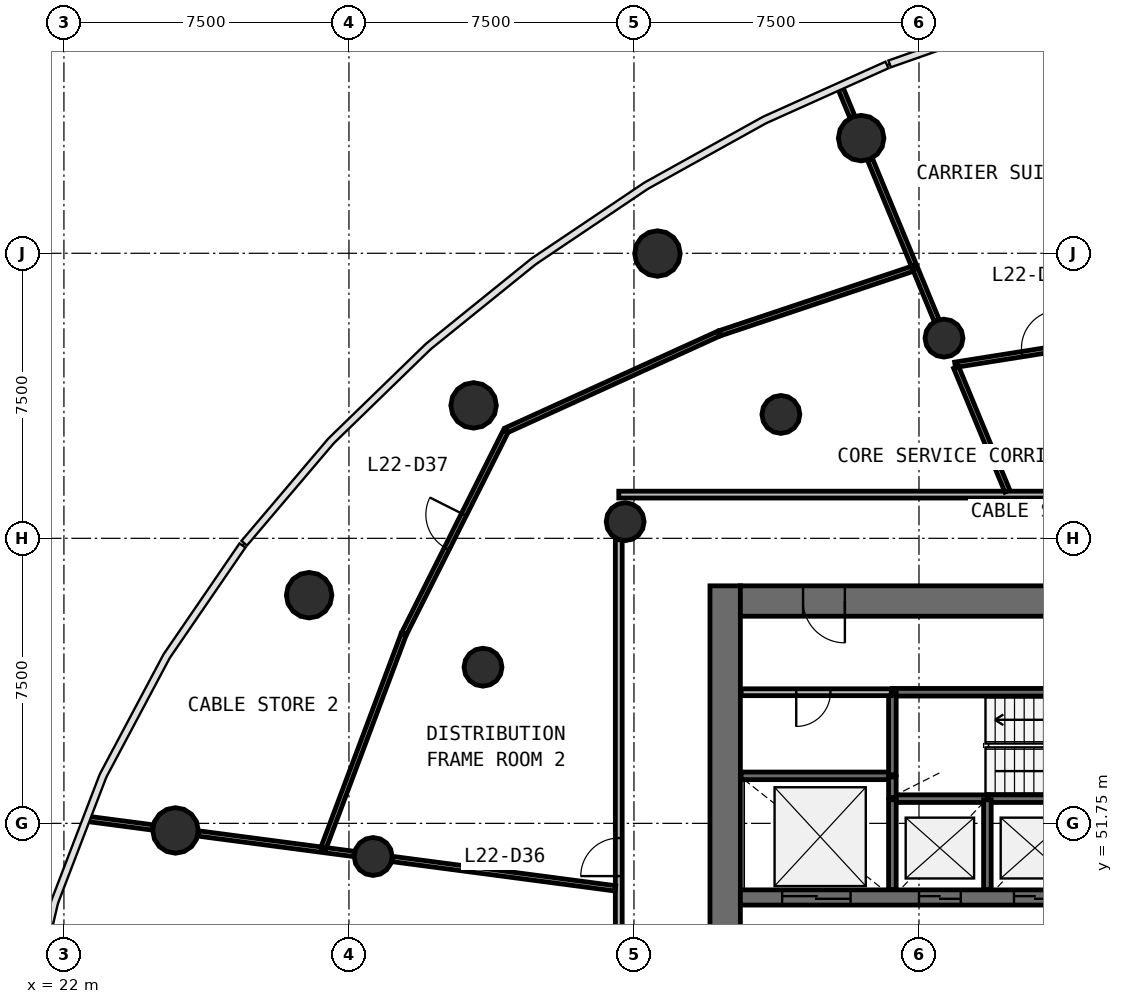
"""IFC4 building model, lengths in metres.
Left out: names, types, materials, properties, quantities, classifications, styles, units other than length and angle.
Written with IfcOpenShell. Run it as: python <this file> out.ifc"""

import sys

from ifc_helpers import new_model, si_unit, direction, frame, frame_2d, origin, origin_2d, place, context, subcontext, project, spatial, rectangle, circle, extrude, source, transform, mapped, element, fill, save


model = new_model("IFC4")
c1 = context("Model", 3, precision=1e-05, world=origin(), true_north=direction((0.0, 1.0)))
c2 = subcontext(c1, "Body", "Model", "MODEL_VIEW")
j1 = project(units=[si_unit("LENGTHUNIT", "METRE"), si_unit("PLANEANGLEUNIT", "RADIAN")], contexts=[c1])
p1 = place(None, origin())
s1 = spatial("IfcSite", under=j1, at=p1, CompositionType="ELEMENT")
p2 = place(p1, origin())
s2 = spatial("IfcBuilding", under=s1, at=p2, CompositionType="ELEMENT")
p3 = place(p2, frame((0.0, 0.0, 96.2)))
s3 = spatial("IfcBuildingStorey", under=s2, at=p3, CompositionType="ELEMENT", Elevation=96.2)
p4 = place(p3, frame((39.4, 58.0, 0.0), z_axis=(0.0, 0.0, 1.0), x_axis=(0.0, -1.0, 0.0)))
e1 = element("IfcWall", 1, at=p4, inside=s3, PredefinedType="SHEAR", context=c2, shape_type="SweptSolid", body=[
    extrude(rectangle(XDim=20.0, YDim=0.8, at=frame_2d((10.0, 0.0))), origin(), (0.0, 0.0, 1.0), 4.1),
])
p5 = place(p4, frame((9.1, 0.0, 0.0)))
e2 = element("IfcOpeningElement", 2, at=p5, cuts=e1, PredefinedType="OPENING", context=c2, shape_type="SweptSolid", body=[
    extrude(rectangle(XDim=1.8, YDim=2.1, at=frame_2d((0.9, 1.05))), frame((0.0, 0.41, 0.0), z_axis=(0.0, -1.0, 0.0), x_axis=(1.0, 0.0, 0.0)), (0.0, 0.0, 1.0), 0.82),
])
p6 = place(p3, frame((64.2, 57.6, 0.0), z_axis=(0.0, 0.0, 1.0), x_axis=(-1.0, 0.0, 0.0)))
e3 = element("IfcWall", 3, at=p6, inside=s3, PredefinedType="SHEAR", context=c2, shape_type="SweptSolid", body=[
    extrude(rectangle(XDim=24.4, YDim=0.8, at=frame_2d((12.2, 0.0))), origin(), (0.0, 0.0, 1.0), 4.1),
])
p7 = place(p6, frame((21.65, 0.0, 0.0)))
e4 = element("IfcOpeningElement", 4, at=p7, cuts=e3, PredefinedType="OPENING", context=c2, shape_type="SweptSolid", body=[
    extrude(rectangle(XDim=1.1, YDim=2.1, at=frame_2d((0.55, 1.05))), frame((0.0, 0.41, 0.0), z_axis=(0.0, -1.0, 0.0), x_axis=(1.0, 0.0, 0.0)), (0.0, 0.0, 1.0), 0.82),
])
p8 = place(p6, frame((2.15, 0.0, 0.0)))
e5 = element("IfcOpeningElement", 5, at=p8, cuts=e3, PredefinedType="OPENING", context=c2, shape_type="SweptSolid", body=[
    extrude(rectangle(XDim=1.1, YDim=2.1, at=frame_2d((0.55, 1.05))), frame((0.0, 0.41, 0.0), z_axis=(0.0, -1.0, 0.0), x_axis=(1.0, 0.0, 0.0)), (0.0, 0.0, 1.0), 0.82),
])
p9 = place(p3, frame((39.8, 49.8, 0.0), z_axis=(0.0, 0.0, 1.0), x_axis=(1.0, 0.0, 0.0)))
e6 = element("IfcWall", 6, at=p9, inside=s3, PredefinedType="SHEAR", context=c2, shape_type="SweptSolid", body=[
    extrude(rectangle(XDim=24.4, YDim=0.4, at=frame_2d((12.2, 0.0))), origin(), (0.0, 0.0, 1.0), 4.1),
])
p10 = place(p9, frame((4.7, 0.0, 0.0)))
e7 = element("IfcOpeningElement", 7, at=p10, cuts=e6, PredefinedType="OPENING", context=c2, shape_type="SweptSolid", body=[
    extrude(rectangle(XDim=1.1, YDim=2.1, at=frame_2d((0.55, 1.05))), frame((0.0, 0.21, 0.0), z_axis=(0.0, -1.0, 0.0), x_axis=(1.0, 0.0, 0.0)), (0.0, 0.0, 1.0), 0.42),
])
p11 = place(p9, frame((7.2, 0.0, 0.0)))
e8 = element("IfcOpeningElement", 8, at=p11, cuts=e6, PredefinedType="OPENING", context=c2, shape_type="SweptSolid", body=[
    extrude(rectangle(XDim=1.1, YDim=2.1, at=frame_2d((0.55, 1.05))), frame((0.0, 0.21, 0.0), z_axis=(0.0, -1.0, 0.0), x_axis=(1.0, 0.0, 0.0)), (0.0, 0.0, 1.0), 0.42),
])
p12 = place(p9, frame((9.7, 0.0, 0.0)))
e9 = element("IfcOpeningElement", 9, at=p12, cuts=e6, PredefinedType="OPENING", context=c2, shape_type="SweptSolid", body=[
    extrude(rectangle(XDim=1.1, YDim=2.1, at=frame_2d((0.55, 1.05))), frame((0.0, 0.21, 0.0), z_axis=(0.0, -1.0, 0.0), x_axis=(1.0, 0.0, 0.0)), (0.0, 0.0, 1.0), 0.42),
])
p13 = place(p9, frame((1.1, 0.0, 0.0)))
e10 = element("IfcOpeningElement", 10, at=p13, cuts=e6, PredefinedType="OPENING", context=c2, shape_type="SweptSolid", body=[
    extrude(rectangle(XDim=1.8, YDim=2.4, at=frame_2d((0.9, 1.2))), frame((0.0, 0.21, 0.0), z_axis=(0.0, -1.0, 0.0), x_axis=(1.0, 0.0, 0.0)), (0.0, 0.0, 1.0), 0.42),
])
p14 = place(p9, frame((20.65, 0.0, 0.0)))
e11 = element("IfcOpeningElement", 11, at=p14, cuts=e6, PredefinedType="OPENING", context=c2, shape_type="SweptSolid", body=[
    extrude(rectangle(XDim=0.9, YDim=2.1, at=frame_2d((0.45, 1.05))), frame((0.0, 0.21, 0.0), z_axis=(0.0, -1.0, 0.0), x_axis=(1.0, 0.0, 0.0)), (0.0, 0.0, 1.0), 0.42),
])
p15 = place(p9, frame((11.85, 0.0, 0.0)))
e12 = element("IfcOpeningElement", 12, at=p15, cuts=e6, PredefinedType="OPENING", context=c2, shape_type="SweptSolid", body=[
    extrude(rectangle(XDim=0.9, YDim=2.1, at=frame_2d((0.45, 1.05))), frame((0.0, 0.21, 0.0), z_axis=(0.0, -1.0, 0.0), x_axis=(1.0, 0.0, 0.0)), (0.0, 0.0, 1.0), 0.42),
])
m1 = source(origin(), c2, "Body", "SweptSolid", [
    extrude(circle(Radius=0.6, at=origin_2d()), origin(), (0.0, 0.0, 1.0), 4.1),
])
for number, where, z_axis, x_axis in (
    (13, (42.978, 69.781, 0.0), (0.0, 0.0, 1.0), (1.0, 0.0, 0.0)),
    (14, (37.618, 66.743, 0.0), (0.0, 0.0, 1.0), (1.0, 0.0, 0.0)),
    (15, (32.78, 62.748, 0.0), (0.0, 0.0, 1.0), (1.0, 0.0, 0.0)),
    (16, (28.452, 57.754, 0.0), (0.0, 0.0, 1.0), (1.0, 0.0, 0.0)),
    (17, (24.936, 51.563, 0.0), (0.0, 0.0, 1.0), (1.0, 0.0, 0.0)),
):
    element("IfcColumn", number, at=place(p3, frame(where, z_axis=z_axis, x_axis=x_axis)), inside=s3, PredefinedType="COLUMN", context=c2, shape_type="MappedRepresentation", body=[
        mapped(m1, transform((0.0, 0.0, 0.0), scale=1.0)),
    ])
m2 = source(origin(), c2, "Body", "SweptSolid", [
    extrude(circle(Radius=0.5, at=origin_2d()), origin(), (0.0, 0.0, 1.0), 4.1),
])
for number, where, z_axis, x_axis in (
    (18, (45.158, 64.518, 0.0), (0.0, 0.0, 1.0), (1.0, 0.0, 0.0)),
    (19, (40.866, 62.51, 0.0), (0.0, 0.0, 1.0), (1.0, 0.0, 0.0)),
    (20, (36.768, 59.688, 0.0), (0.0, 0.0, 1.0), (1.0, 0.0, 0.0)),
    (21, (33.028, 55.859, 0.0), (0.0, 0.0, 1.0), (1.0, 0.0, 0.0)),
    (22, (30.137, 50.878, 0.0), (0.0, 0.0, 1.0), (1.0, 0.0, 0.0)),
):
    element("IfcColumn", number, at=place(p3, frame(where, z_axis=z_axis, x_axis=x_axis)), inside=s3, PredefinedType="COLUMN", context=c2, shape_type="MappedRepresentation", body=[
        mapped(m2, transform((0.0, 0.0, 0.0), scale=1.0)),
    ])
p16 = place(p3, frame((50.4, 55.2, 0.0), z_axis=(0.0, 0.0, 1.0), x_axis=(-1.0, 0.0, 0.0)))
e23 = element("IfcWall", 23, at=p16, inside=s3, PredefinedType="SOLIDWALL", context=c2, shape_type="SweptSolid", body=[
    extrude(rectangle(XDim=6.6, YDim=0.2, at=frame_2d((3.3, 0.0))), origin(), (0.0, 0.0, 1.0), 3.7),
])
p17 = place(p16, frame((0.3, 0.0, 0.0)))
e24 = element("IfcOpeningElement", 24, at=p17, cuts=e23, PredefinedType="OPENING", context=c2, shape_type="SweptSolid", body=[
    extrude(rectangle(XDim=1.2, YDim=2.1, at=frame_2d((0.6, 1.05))), frame((0.0, 0.11, 0.0), z_axis=(0.0, -1.0, 0.0), x_axis=(1.0, 0.0, 0.0)), (0.0, 0.0, 1.0), 0.22),
])
p18 = place(p3, frame((43.8, 53.0, 0.0), z_axis=(0.0, 0.0, 1.0), x_axis=(-1.0, 0.0, 0.0)))
e25 = element("IfcWall", 25, at=p18, inside=s3, PredefinedType="SOLIDWALL", context=c2, shape_type="SweptSolid", body=[
    extrude(rectangle(XDim=3.98, YDim=0.2, at=frame_2d((1.99, 0.0))), origin(), (0.0, 0.0, 1.0), 3.7),
])
p19 = place(p3, frame((46.3, 52.4, 0.0), z_axis=(0.0, 0.0, 1.0), x_axis=(-1.0, 0.0, 0.0)))
e26 = element("IfcWall", 26, at=p19, inside=s3, PredefinedType="SOLIDWALL", context=c2, shape_type="SweptSolid", body=[
    extrude(rectangle(XDim=2.5, YDim=0.2, at=frame_2d((1.25, 0.0))), origin(), (0.0, 0.0, 1.0), 3.7),
])
p20 = place(p3, frame((48.8, 52.4, 0.0), z_axis=(0.0, 0.0, 1.0), x_axis=(-1.0, 0.0, 0.0)))
e27 = element("IfcWall", 27, at=p20, inside=s3, PredefinedType="SOLIDWALL", context=c2, shape_type="SweptSolid", body=[
    extrude(rectangle(XDim=2.47, YDim=0.2, at=frame_2d((1.235, 0.0))), origin(), (0.0, 0.0, 1.0), 3.7),
])
for number, where, z_axis, x_axis in (
    (28, (43.8, 52.37, 0.0), (0.0, 0.0, 1.0), (0.0, -1.0, 0.0)),
    (29, (46.3, 50.01, 0.0), (0.0, 0.0, 1.0), (0.0, 1.0, 0.0)),
):
    element("IfcWall", number, at=place(p3, frame(where, z_axis=z_axis, x_axis=x_axis)), inside=s3, PredefinedType="SOLIDWALL", context=c2, shape_type="SweptSolid", body=[
        extrude(rectangle(XDim=2.36, YDim=0.2, at=frame_2d((1.18, 0.0))), origin(), (0.0, 0.0, 1.0), 3.7),
    ])
p21 = place(p3, frame((43.8, 55.17, 0.0), z_axis=(0.0, 0.0, 1.0), x_axis=(0.0, -1.0, 0.0)))
e30 = element("IfcWall", 30, at=p21, inside=s3, PredefinedType="SOLIDWALL", context=c2, shape_type="SweptSolid", body=[
    extrude(rectangle(XDim=2.14, YDim=0.2, at=frame_2d((1.07, 0.0))), origin(), (0.0, 0.0, 1.0), 3.7),
])
p22 = place(p3, frame((43.8, 52.43, 0.0), z_axis=(0.0, 0.0, 1.0), x_axis=(0.0, 1.0, 0.0)))
e31 = element("IfcWall", 31, at=p22, inside=s3, PredefinedType="SOLIDWALL", context=c2, shape_type="SweptSolid", body=[
    extrude(rectangle(XDim=0.54, YDim=0.2, at=frame_2d((0.27, 0.0))), origin(), (0.0, 0.0, 1.0), 3.7),
])
p23 = place(p3, frame((36.6, 60.4, 0.0), z_axis=(0.0, 0.0, 1.0), x_axis=(1.0, 0.0, 0.0)))
e32 = element("IfcWall", 32, at=p23, inside=s3, PredefinedType="PARTITIONING", context=c2, shape_type="SweptSolid", body=[
    extrude(rectangle(XDim=30.8, YDim=0.18, at=frame_2d((15.4, 0.0))), origin(), (0.0, 0.0, 1.0), 2.9),
])
p24 = place(p23, frame((17.35, 0.0, 0.0)))
e33 = element("IfcOpeningElement", 33, at=p24, cuts=e32, PredefinedType="OPENING", context=c2, shape_type="SweptSolid", body=[
    extrude(rectangle(XDim=1.0, YDim=2.1, at=frame_2d((0.5, 1.05))), frame((0.0, 0.1, 0.0), z_axis=(0.0, -1.0, 0.0), x_axis=(1.0, 0.0, 0.0)), (0.0, 0.0, 1.0), 0.2),
])
p25 = place(p23, frame((14.95, 0.0, 0.0)))
e34 = element("IfcOpeningElement", 34, at=p25, cuts=e32, PredefinedType="OPENING", context=c2, shape_type="SweptSolid", body=[
    extrude(rectangle(XDim=1.0, YDim=2.1, at=frame_2d((0.5, 1.05))), frame((0.0, 0.1, 0.0), z_axis=(0.0, -1.0, 0.0), x_axis=(1.0, 0.0, 0.0)), (0.0, 0.0, 1.0), 0.2),
])
p26 = place(p3, frame((36.6, 35.63, 0.0), z_axis=(0.0, 0.0, 1.0), x_axis=(0.0, 1.0, 0.0)))
e35 = element("IfcWall", 35, at=p26, inside=s3, PredefinedType="PARTITIONING", context=c2, shape_type="SweptSolid", body=[
    extrude(rectangle(XDim=23.583, YDim=0.18, at=frame_2d((11.791, 0.0))), origin(), (0.0, 0.0, 1.0), 2.9),
])
p27 = place(p26, frame((14.732, 0.0, 0.0)))
e36 = element("IfcOpeningElement", 36, at=p27, cuts=e35, PredefinedType="OPENING", context=c2, shape_type="SweptSolid", body=[
    extrude(rectangle(XDim=1.0, YDim=2.1, at=frame_2d((0.5, 1.05))), frame((0.0, 0.1, 0.0), z_axis=(0.0, -1.0, 0.0), x_axis=(1.0, 0.0, 0.0)), (0.0, 0.0, 1.0), 0.2),
])
p28 = place(p26, frame((11.333, 0.0, 0.0)))
e37 = element("IfcOpeningElement", 37, at=p28, cuts=e35, PredefinedType="OPENING", context=c2, shape_type="SweptSolid", body=[
    extrude(rectangle(XDim=1.0, YDim=2.1, at=frame_2d((0.5, 1.05))), frame((0.0, 0.1, 0.0), z_axis=(0.0, -1.0, 0.0), x_axis=(1.0, 0.0, 0.0)), (0.0, 0.0, 1.0), 0.2),
])
p29 = place(p3, frame((43.77, 55.2, 0.0), z_axis=(0.0, 0.0, 1.0), x_axis=(-1.0, 0.0, 0.0)))
e38 = element("IfcWall", 38, at=p29, inside=s3, PredefinedType="PARTITIONING", context=c2, shape_type="SweptSolid", body=[
    extrude(rectangle(XDim=3.95, YDim=0.18, at=frame_2d((1.975, 0.0))), origin(), (0.0, 0.0, 1.0), 3.7),
])
p30 = place(p29, frame((1.6, 0.0, 0.0)))
e39 = element("IfcOpeningElement", 39, at=p30, cuts=e38, PredefinedType="OPENING", context=c2, shape_type="SweptSolid", body=[
    extrude(rectangle(XDim=0.9, YDim=2.1, at=frame_2d((0.45, 1.05))), frame((0.0, 0.1, 0.0), z_axis=(0.0, -1.0, 0.0), x_axis=(1.0, 0.0, 0.0)), (0.0, 0.0, 1.0), 0.2),
])
p31 = place(p3, frame((39.234, 64.637, 0.0), z_axis=(0.0, 0.0, 1.0), x_axis=(-0.910171936686, -0.414230667224, 0.0)))
e40 = element("IfcWall", 40, at=p31, inside=s3, PredefinedType="PARTITIONING", context=c2, shape_type="SweptSolid", body=[
    extrude(rectangle(XDim=6.149, YDim=0.14, at=frame_2d((3.074, 0.0))), origin(), (0.0, 0.0, 1.0), 2.9),
])
p32 = place(p3, frame((30.941, 56.723, 0.0), z_axis=(0.0, 0.0, 1.0), x_axis=(-0.351569554584, -0.936161763954, 0.0)))
e41 = element("IfcWall", 41, at=p32, inside=s3, PredefinedType="PARTITIONING", context=c2, shape_type="SweptSolid", body=[
    extrude(rectangle(XDim=6.057, YDim=0.14, at=frame_2d((3.028, 0.0))), origin(), (0.0, 0.0, 1.0), 2.9),
])
p33 = place(p3, frame((36.51, 50.039, 0.0), z_axis=(0.0, 0.0, 1.0), x_axis=(-0.991445034615, 0.130524876315, 0.0)))
e42 = element("IfcWall", 42, at=p33, inside=s3, PredefinedType="PARTITIONING", context=c2, shape_type="SweptSolid", body=[
    extrude(rectangle(XDim=5.924, YDim=0.14, at=frame_2d((2.962, 0.0))), origin(), (0.0, 0.0, 1.0), 2.9),
])
p34 = place(p3, frame((30.954, 56.75, 0.0), z_axis=(0.0, 0.0, 1.0), x_axis=(0.448904295409, 0.89357984174, 0.0)))
e43 = element("IfcWall", 43, at=p34, inside=s3, PredefinedType="PARTITIONING", context=c2, shape_type="SweptSolid", body=[
    extrude(rectangle(XDim=5.947, YDim=0.14, at=frame_2d((2.973, 0.0))), origin(), (0.0, 0.0, 1.0), 2.9),
])
p35 = place(p34, frame((2.497, 0.0, 0.0)))
e44 = element("IfcOpeningElement", 44, at=p35, cuts=e43, PredefinedType="OPENING", context=c2, shape_type="SweptSolid", body=[
    extrude(rectangle(XDim=1.0, YDim=2.1, at=frame_2d((0.5, 1.05))), frame((0.0, 0.08, 0.0), z_axis=(0.0, -1.0, 0.0), x_axis=(1.0, 0.0, 0.0)), (0.0, 0.0, 1.0), 0.16),
])
p36 = place(p3, frame((44.394, 66.363, 0.0), z_axis=(0.0, 0.0, 1.0), x_axis=(-0.948344350496, -0.317242797999, 0.0)))
e45 = element("IfcWall", 45, at=p36, inside=s3, PredefinedType="PARTITIONING", context=c2, shape_type="SweptSolid", body=[
    extrude(rectangle(XDim=5.411, YDim=0.14, at=frame_2d((2.706, 0.0))), origin(), (0.0, 0.0, 1.0), 2.9),
])
p37 = place(p3, frame((45.448, 63.816, 0.0), z_axis=(0.0, 0.0, 1.0), x_axis=(0.987681104019, 0.156480148144, 0.0)))
e46 = element("IfcWall", 46, at=p37, inside=s3, PredefinedType="PARTITIONING", context=c2, shape_type="SweptSolid", body=[
    extrude(rectangle(XDim=4.433, YDim=0.14, at=frame_2d((2.216, 0.0))), origin(), (0.0, 0.0, 1.0), 2.9),
])
p38 = place(p37, frame((1.782, 0.0, 0.0)))
e47 = element("IfcOpeningElement", 47, at=p38, cuts=e46, PredefinedType="OPENING", context=c2, shape_type="SweptSolid", body=[
    extrude(rectangle(XDim=1.0, YDim=2.1, at=frame_2d((0.5, 1.05))), frame((0.0, 0.08, 0.0), z_axis=(0.0, -1.0, 0.0), x_axis=(1.0, 0.0, 0.0)), (0.0, 0.0, 1.0), 0.16),
])
p39 = place(p3, frame((28.883, 51.043, 0.0), z_axis=(0.0, 0.0, 1.0), x_axis=(0.991425859851, -0.130670442021, 0.0)))
e48 = element("IfcWall", 48, at=p39, inside=s3, PredefinedType="PARTITIONING", context=c2, shape_type="SweptSolid", body=[
    extrude(rectangle(XDim=0.76, YDim=0.14, at=frame_2d((0.38, 0.0))), origin(), (0.0, 0.0, 1.0), 2.9),
])
p40 = place(p3, frame((25.535, 51.484, 0.0), z_axis=(0.0, 0.0, 1.0), x_axis=(0.991444651245, -0.130527788296, 0.0)))
e49 = element("IfcWall", 49, at=p40, inside=s3, PredefinedType="PARTITIONING", context=c2, shape_type="SweptSolid", body=[
    extrude(rectangle(XDim=3.275, YDim=0.14, at=frame_2d((1.638, 0.0))), origin(), (0.0, 0.0, 1.0), 2.9),
])
p41 = place(p3, frame((46.826, 60.49, 0.0), z_axis=(0.0, 0.0, 1.0), x_axis=(-0.382624745771, 0.923903839111, 0.0)))
e50 = element("IfcWall", 50, at=p41, inside=s3, PredefinedType="PARTITIONING", context=c2, shape_type="SweptSolid", body=[
    extrude(rectangle(XDim=3.529, YDim=0.14, at=frame_2d((1.764, 0.0))), origin(), (0.0, 0.0, 1.0), 2.9),
])
p42 = place(p3, frame((44.367, 66.428, 0.0), z_axis=(0.0, 0.0, 1.0), x_axis=(-0.382653687311, 0.923891852755, 0.0)))
e51 = element("IfcWall", 51, at=p42, inside=s3, PredefinedType="PARTITIONING", context=c2, shape_type="SweptSolid", body=[
    extrude(rectangle(XDim=3.024, YDim=0.14, at=frame_2d((1.512, 0.0))), origin(), (0.0, 0.0, 1.0), 2.9),
])
p43 = place(p3, frame((24.336, 51.642, 0.0), z_axis=(0.0, 0.0, 1.0), x_axis=(-0.991440556446, 0.13055888723, 0.0)))
e52 = element("IfcWall", 52, at=p43, inside=s3, PredefinedType="PARTITIONING", context=c2, shape_type="SweptSolid", body=[
    extrude(rectangle(XDim=1.694, YDim=0.14, at=frame_2d((0.847, 0.0))), origin(), (0.0, 0.0, 1.0), 2.9),
])
p44 = place(p3, frame((44.965, 64.984, 0.0), z_axis=(0.0, 0.0, 1.0), x_axis=(-0.382813576456, 0.923825614324, 0.0)))
e53 = element("IfcWall", 53, at=p44, inside=s3, PredefinedType="PARTITIONING", context=c2, shape_type="SweptSolid", body=[
    extrude(rectangle(XDim=1.463, YDim=0.14, at=frame_2d((0.731, 0.0))), origin(), (0.0, 0.0, 1.0), 2.9),
])
p45 = place(p3, frame((42.747, 70.34, 0.0), z_axis=(0.0, 0.0, 1.0), x_axis=(-0.382766463222, 0.923845135633, 0.0)))
e54 = element("IfcWall", 54, at=p45, inside=s3, PredefinedType="PARTITIONING", context=c2, shape_type="SweptSolid", body=[
    extrude(rectangle(XDim=0.797, YDim=0.14, at=frame_2d((0.399, 0.0))), origin(), (0.0, 0.0, 1.0), 2.9),
])
m3 = source(origin(), c2, "Body", "SweptSolid", [
    extrude(rectangle(XDim=1.1, YDim=2.1, at=frame_2d((0.55, 1.05))), frame((0.0, 0.025, 0.0), z_axis=(0.0, -1.0, 0.0), x_axis=(1.0, 0.0, 0.0)), (0.0, 0.0, 1.0), 0.05),
])
p46 = place(p10, origin())
e55 = element("IfcDoor", 55, at=p46, inside=s3, OperationType="DOUBLE_DOOR_SLIDING", PredefinedType="USERDEFINED", context=c2, shape_type="MappedRepresentation", body=[
    mapped(m3, transform((0.0, 0.0, 0.0), scale=1.0)),
])
fill(e7, e55)
p47 = place(p11, origin())
e56 = element("IfcDoor", 56, at=p47, inside=s3, OperationType="DOUBLE_DOOR_SLIDING", PredefinedType="USERDEFINED", context=c2, shape_type="MappedRepresentation", body=[
    mapped(m3, transform((0.0, 0.0, 0.0), scale=1.0)),
])
fill(e8, e56)
m4 = source(origin(), c2, "Body", "SweptSolid", [
    extrude(rectangle(XDim=1.8, YDim=2.4, at=frame_2d((0.9, 1.2))), frame((0.0, 0.025, 0.0), z_axis=(0.0, -1.0, 0.0), x_axis=(1.0, 0.0, 0.0)), (0.0, 0.0, 1.0), 0.05),
])
p48 = place(p13, origin())
e57 = element("IfcDoor", 57, at=p48, inside=s3, OperationType="DOUBLE_DOOR_SLIDING", PredefinedType="USERDEFINED", context=c2, shape_type="MappedRepresentation", body=[
    mapped(m4, transform((0.0, 0.0, 0.0), scale=1.0)),
])
fill(e10, e57)
m5 = source(origin(), c2, "Body", "SweptSolid", [
    extrude(rectangle(XDim=1.1, YDim=2.1, at=frame_2d((0.55, 1.05))), frame((0.0, 0.025, 0.0), z_axis=(0.0, -1.0, 0.0), x_axis=(1.0, 0.0, 0.0)), (0.0, 0.0, 1.0), 0.05),
])
p49 = place(p7, origin())
e58 = element("IfcDoor", 58, at=p49, inside=s3, OperationType="SINGLE_SWING_LEFT", PredefinedType="DOOR", context=c2, shape_type="MappedRepresentation", body=[
    mapped(m5, transform((0.0, 0.0, 0.0), scale=1.0)),
])
fill(e4, e58)
m6 = source(origin(), c2, "Body", "SweptSolid", [
    extrude(rectangle(XDim=1.0, YDim=2.1, at=frame_2d((0.5, 1.05))), frame((0.0, 0.025, 0.0), z_axis=(0.0, -1.0, 0.0), x_axis=(1.0, 0.0, 0.0)), (0.0, 0.0, 1.0), 0.05),
])
p50 = place(p38, origin())
e59 = element("IfcDoor", 59, at=p50, inside=s3, OperationType="SINGLE_SWING_RIGHT", PredefinedType="DOOR", context=c2, shape_type="MappedRepresentation", body=[
    mapped(m6, transform((0.0, 0.0, 0.0), scale=1.0)),
])
fill(e47, e59)
p51 = place(p27, origin())
e60 = element("IfcDoor", 60, at=p51, inside=s3, OperationType="SINGLE_SWING_LEFT", PredefinedType="DOOR", context=c2, shape_type="MappedRepresentation", body=[
    mapped(m6, transform((0.0, 0.0, 0.0), scale=1.0)),
])
fill(e36, e60)
p52 = place(p35, origin())
e61 = element("IfcDoor", 61, at=p52, inside=s3, OperationType="SINGLE_SWING_RIGHT", PredefinedType="DOOR", context=c2, shape_type="MappedRepresentation", body=[
    mapped(m6, transform((0.0, 0.0, 0.0), scale=1.0)),
])
fill(e44, e61)
m7 = source(origin(), c2, "Body", "SweptSolid", [
    extrude(rectangle(XDim=0.9, YDim=2.1, at=frame_2d((0.45, 1.05))), frame((0.0, 0.025, 0.0), z_axis=(0.0, -1.0, 0.0), x_axis=(1.0, 0.0, 0.0)), (0.0, 0.0, 1.0), 0.05),
])
p53 = place(p30, origin())
e62 = element("IfcDoor", 62, at=p53, inside=s3, OperationType="SINGLE_SWING_RIGHT", PredefinedType="DOOR", context=c2, shape_type="MappedRepresentation", body=[
    mapped(m7, transform((0.0, 0.0, 0.0), scale=1.0)),
])
fill(e39, e62)
save(model, sys.argv[1])
